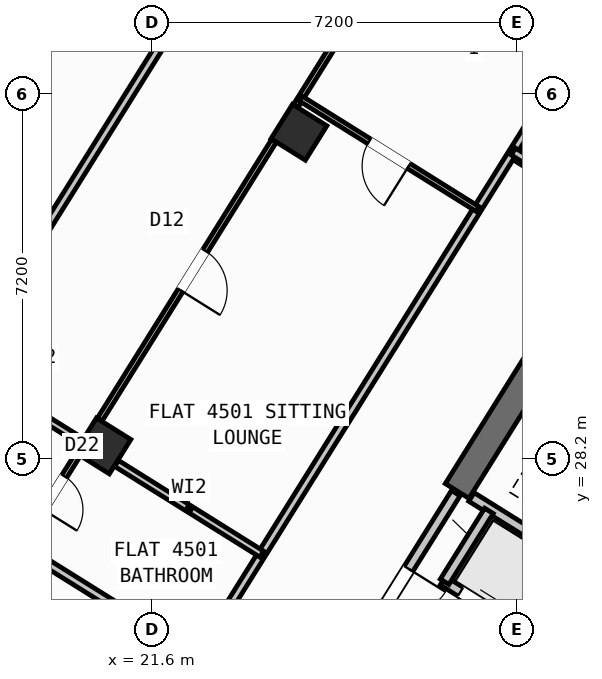
"""IFC4 building model, lengths in metres.
Left out: names, types, materials, properties, quantities, classifications, styles, units other than length and angle.
Written with IfcOpenShell. Run it as: python <this file> out.ifc"""

import sys

from ifc_helpers import new_model, si_unit, direction, frame, frame_2d, origin, origin_2d, place, context, subcontext, project, spatial, rectangle, hollow_rectangle, extrude, source, transform, mapped, element, fill, save


model = new_model("IFC4")
c1 = context("Model", 3, precision=1e-05, world=origin(), true_north=direction((0.0, 1.0)))
c2 = subcontext(c1, "Body", "Model", "MODEL_VIEW")
j1 = project(units=[si_unit("LENGTHUNIT", "METRE"), si_unit("PLANEANGLEUNIT", "RADIAN")], contexts=[c1])
p1 = place(None, origin())
s1 = spatial("IfcSite", under=j1, at=p1, CompositionType="ELEMENT")
p2 = place(p1, origin())
s2 = spatial("IfcBuilding", under=s1, at=p2, CompositionType="ELEMENT")
p3 = place(p2, frame((0.0, 0.0, 179.4)))
s3 = spatial("IfcBuildingStorey", under=s2, at=p3, CompositionType="ELEMENT", Elevation=179.4)
p4 = place(p3, frame((29.517, 30.594, 0.0), z_axis=(0.0, 0.0, 1.0), x_axis=(-0.529906864564, -0.848055844204, 0.0)))
e1 = element("IfcWall", 1, at=p4, inside=s3, PredefinedType="SHEAR", context=c2, shape_type="SweptSolid", body=[
    extrude(rectangle(XDim=3.575, YDim=0.55, at=frame_2d((1.788, 0.0))), origin(), (0.0, 0.0, 1.0), 4.55),
])
m1 = source(origin(), c2, "Body", "SweptSolid", [
    extrude(hollow_rectangle(XDim=0.8, YDim=0.8, WallThickness=0.032, at=origin_2d()), origin(), (0.0, 0.0, 1.0), 4.8),
])
for number, where, z_axis, x_axis in (
    (2, (24.5, 34.643, 0.0), (0.0, 0.0, 1.0), (-0.848, 0.53, 0.0)),
    (3, (20.632, 28.452, 0.0), (0.0, 0.0, 1.0), (-0.848, 0.53, 0.0)),
):
    element("IfcColumn", number, at=place(p3, frame(where, z_axis=z_axis, x_axis=x_axis)), inside=s3, PredefinedType="COLUMN", context=c2, shape_type="MappedRepresentation", body=[
        mapped(m1, transform((0.0, 0.0, 0.0), scale=1.0)),
    ])
p5 = place(p3, frame((31.76, 12.183, 0.0), z_axis=(0.0, 0.0, 1.0), x_axis=(-0.848047074256, 0.529920899612, 0.0)))
e4 = element("IfcWall", 4, at=p5, inside=s3, PredefinedType="STANDARD", context=c2, shape_type="SweptSolid", body=[
    extrude(rectangle(XDim=30.652, YDim=0.32, at=frame_2d((15.326, 0.0))), origin(), (0.0, 0.0, 1.0), 4.55),
])
p6 = place(p5, frame((21.52, 0.0, 0.0)))
e5 = element("IfcOpeningElement", 5, at=p6, cuts=e4, PredefinedType="OPENING", context=c2, shape_type="SweptSolid", body=[
    extrude(rectangle(XDim=1.2, YDim=2.15, at=frame_2d((0.6, 1.075))), frame((0.0, 0.17, 0.0), z_axis=(0.0, -1.0, 0.0), x_axis=(1.0, 0.0, 0.0)), (0.0, 0.0, 1.0), 0.34),
])
p7 = place(p5, frame((14.878, 0.0, 0.0)))
e6 = element("IfcOpeningElement", 6, at=p7, cuts=e4, PredefinedType="OPENING", context=c2, shape_type="SweptSolid", body=[
    extrude(rectangle(XDim=1.5, YDim=2.25, at=frame_2d((0.75, 1.125))), frame((0.0, 0.17, 0.0), z_axis=(0.0, -1.0, 0.0), x_axis=(1.0, 0.0, 0.0)), (0.0, 0.0, 1.0), 0.34),
])
p8 = place(p5, frame((1.865, 0.0, 0.75)))
e7 = element("IfcOpeningElement", 7, at=p8, cuts=e4, PredefinedType="OPENING", context=c2, shape_type="SweptSolid", body=[
    extrude(rectangle(XDim=2.4, YDim=1.6, at=frame_2d((1.2, 0.8))), frame((0.0, 0.17, 0.0), z_axis=(0.0, -1.0, 0.0), x_axis=(1.0, 0.0, 0.0)), (0.0, 0.0, 1.0), 0.34),
])
p9 = place(p5, frame((7.094, 0.0, 0.75)))
e8 = element("IfcOpeningElement", 8, at=p9, cuts=e4, PredefinedType="OPENING", context=c2, shape_type="SweptSolid", body=[
    extrude(rectangle(XDim=2.4, YDim=1.6, at=frame_2d((1.2, 0.8))), frame((0.0, 0.17, 0.0), z_axis=(0.0, -1.0, 0.0), x_axis=(1.0, 0.0, 0.0)), (0.0, 0.0, 1.0), 0.34),
])
p10 = place(p5, frame((19.404, 0.0, 0.95)))
e9 = element("IfcOpeningElement", 9, at=p10, cuts=e4, PredefinedType="OPENING", context=c2, shape_type="SweptSolid", body=[
    extrude(rectangle(XDim=1.2, YDim=1.4, at=frame_2d((0.6, 0.7))), frame((0.0, 0.17, 0.0), z_axis=(0.0, -1.0, 0.0), x_axis=(1.0, 0.0, 0.0)), (0.0, 0.0, 1.0), 0.34),
])
p11 = place(p5, frame((26.458, 0.0, 0.75)))
e10 = element("IfcOpeningElement", 10, at=p11, cuts=e4, PredefinedType="OPENING", context=c2, shape_type="SweptSolid", body=[
    extrude(rectangle(XDim=2.4, YDim=1.6, at=frame_2d((1.2, 0.8))), frame((0.0, 0.17, 0.0), z_axis=(0.0, -1.0, 0.0), x_axis=(1.0, 0.0, 0.0)), (0.0, 0.0, 1.0), 0.34),
])
p12 = place(p3, frame((17.424, 47.083, 0.0), z_axis=(0.0, 0.0, 1.0), x_axis=(0.848049927979, -0.529916332693, 0.0)))
e11 = element("IfcWall", 11, at=p12, inside=s3, PredefinedType="STANDARD", context=c2, shape_type="SweptSolid", body=[
    extrude(rectangle(XDim=29.223, YDim=0.32, at=frame_2d((14.612, 0.0))), origin(), (0.0, 0.0, 1.0), 4.55),
])
p13 = place(p12, frame((2.745, 0.0, 0.0)))
e12 = element("IfcOpeningElement", 12, at=p13, cuts=e11, PredefinedType="OPENING", context=c2, shape_type="SweptSolid", body=[
    extrude(rectangle(XDim=1.05, YDim=2.15, at=frame_2d((0.525, 1.075))), frame((0.0, 0.17, 0.0), z_axis=(0.0, -1.0, 0.0), x_axis=(1.0, 0.0, 0.0)), (0.0, 0.0, 1.0), 0.34),
])
p14 = place(p12, frame((21.926, 0.0, 0.75)))
e13 = element("IfcOpeningElement", 13, at=p14, cuts=e11, PredefinedType="OPENING", context=c2, shape_type="SweptSolid", body=[
    extrude(rectangle(XDim=2.4, YDim=1.6, at=frame_2d((1.2, 0.8))), frame((0.0, 0.17, 0.0), z_axis=(0.0, -1.0, 0.0), x_axis=(1.0, 0.0, 0.0)), (0.0, 0.0, 1.0), 0.34),
])
p15 = place(p12, frame((26.934, 0.0, 0.95)))
e14 = element("IfcOpeningElement", 14, at=p15, cuts=e11, PredefinedType="OPENING", context=c2, shape_type="SweptSolid", body=[
    extrude(rectangle(XDim=1.2, YDim=1.4, at=frame_2d((0.6, 0.7))), frame((0.0, 0.17, 0.0), z_axis=(0.0, -1.0, 0.0), x_axis=(1.0, 0.0, 0.0)), (0.0, 0.0, 1.0), 0.34),
])
p16 = place(p12, frame((10.057, 0.0, 1.0)))
e15 = element("IfcOpeningElement", 15, at=p16, cuts=e11, PredefinedType="OPENING", context=c2, shape_type="SweptSolid", body=[
    extrude(rectangle(XDim=0.65, YDim=1.15, at=frame_2d((0.325, 0.575))), frame((0.0, 0.17, 0.0), z_axis=(0.0, -1.0, 0.0), x_axis=(1.0, 0.0, 0.0)), (0.0, 0.0, 1.0), 0.34),
])
p17 = place(p12, frame((14.636, 0.0, 1.0)))
e16 = element("IfcOpeningElement", 16, at=p17, cuts=e11, PredefinedType="OPENING", context=c2, shape_type="SweptSolid", body=[
    extrude(rectangle(XDim=0.9, YDim=1.25, at=frame_2d((0.45, 0.625))), frame((0.0, 0.17, 0.0), z_axis=(0.0, -1.0, 0.0), x_axis=(1.0, 0.0, 0.0)), (0.0, 0.0, 1.0), 0.34),
])
p18 = place(p12, frame((8.052, 0.0, 1.0)))
e17 = element("IfcOpeningElement", 17, at=p18, cuts=e11, PredefinedType="OPENING", context=c2, shape_type="SweptSolid", body=[
    extrude(rectangle(XDim=0.65, YDim=1.15, at=frame_2d((0.325, 0.575))), frame((0.0, 0.17, 0.0), z_axis=(0.0, -1.0, 0.0), x_axis=(1.0, 0.0, 0.0)), (0.0, 0.0, 1.0), 0.34),
])
p19 = place(p3, frame((31.822, 24.998, 0.0), z_axis=(0.0, 0.0, 1.0), x_axis=(-0.848036912365, 0.52993716162, 0.0)))
e18 = element("IfcWall", 18, at=p19, inside=s3, PredefinedType="STANDARD", context=c2, shape_type="SweptSolid", body=[
    extrude(rectangle(XDim=4.618, YDim=0.2, at=frame_2d((2.309, 0.0))), origin(), (0.0, 0.0, 1.0), 4.54),
])
p20 = place(p3, frame((32.108, 22.814, 0.0), z_axis=(0.0, 0.0, 1.0), x_axis=(-0.848042229521, 0.529928652696, 0.0)))
e19 = element("IfcWall", 19, at=p20, inside=s3, PredefinedType="STANDARD", context=c2, shape_type="SweptSolid", body=[
    extrude(rectangle(XDim=5.62, YDim=0.2, at=frame_2d((2.81, 0.0))), origin(), (0.0, 0.0, 1.0), 4.54),
])
p21 = place(p20, frame((0.39, 0.0, 0.0)))
e20 = element("IfcOpeningElement", 20, at=p21, cuts=e19, PredefinedType="OPENING", context=c2, shape_type="SweptSolid", body=[
    extrude(rectangle(XDim=1.1, YDim=2.15, at=frame_2d((0.55, 1.075))), frame((0.0, 0.11, 0.0), z_axis=(0.0, -1.0, 0.0), x_axis=(1.0, 0.0, 0.0)), (0.0, 0.0, 1.0), 0.22),
])
p22 = place(p20, frame((2.25, 0.0, 0.0)))
e21 = element("IfcOpeningElement", 21, at=p22, cuts=e19, PredefinedType="OPENING", context=c2, shape_type="SweptSolid", body=[
    extrude(rectangle(XDim=1.1, YDim=2.15, at=frame_2d((0.55, 1.075))), frame((0.0, 0.11, 0.0), z_axis=(0.0, -1.0, 0.0), x_axis=(1.0, 0.0, 0.0)), (0.0, 0.0, 1.0), 0.22),
])
p23 = place(p20, frame((4.11, 0.0, 0.0)))
e22 = element("IfcOpeningElement", 22, at=p23, cuts=e19, PredefinedType="OPENING", context=c2, shape_type="SweptSolid", body=[
    extrude(rectangle(XDim=1.1, YDim=2.15, at=frame_2d((0.55, 1.075))), frame((0.0, 0.11, 0.0), z_axis=(0.0, -1.0, 0.0), x_axis=(1.0, 0.0, 0.0)), (0.0, 0.0, 1.0), 0.22),
])
p24 = place(p3, frame((28.25, 27.17, 0.0), z_axis=(0.0, 0.0, 1.0), x_axis=(-0.529905827651, -0.848056492117, 0.0)))
e23 = element("IfcWall", 23, at=p24, inside=s3, PredefinedType="STANDARD", context=c2, shape_type="SweptSolid", body=[
    extrude(rectangle(XDim=1.65, YDim=0.2, at=frame_2d((0.825, 0.0))), origin(), (0.0, 0.0, 1.0), 4.54),
])
p25 = place(p3, frame((29.801, 26.142, 0.0), z_axis=(0.0, 0.0, 1.0), x_axis=(-0.529998940003, -0.847998304005, 0.0)))
e24 = element("IfcWall", 24, at=p25, inside=s3, PredefinedType="STANDARD", context=c2, shape_type="SweptSolid", body=[
    extrude(rectangle(XDim=1.58, YDim=0.2, at=frame_2d((0.79, 0.0))), origin(), (0.0, 0.0, 1.0), 4.54),
])
p26 = place(p3, frame((27.596, 27.52, 0.0), z_axis=(0.0, 0.0, 1.0), x_axis=(-0.529865479138, -0.848081702443, 0.0)))
e25 = element("IfcWall", 25, at=p26, inside=s3, PredefinedType="STANDARD", context=c2, shape_type="SweptSolid", body=[
    extrude(rectangle(XDim=2.96, YDim=0.2, at=frame_2d((1.48, 0.0))), origin(), (0.0, 0.0, 1.0), 4.54),
])
p27 = place(p26, frame((1.76, 0.0, 0.0)))
e26 = element("IfcOpeningElement", 26, at=p27, cuts=e25, PredefinedType="OPENING", context=c2, shape_type="SweptSolid", body=[
    extrude(rectangle(XDim=0.86, YDim=2.05, at=frame_2d((0.43, 1.025))), frame((0.0, 0.11, 0.0), z_axis=(0.0, -1.0, 0.0), x_axis=(1.0, 0.0, 0.0)), (0.0, 0.0, 1.0), 0.22),
])
p28 = place(p3, frame((30.914, 32.829, 0.0), z_axis=(0.0, 0.0, 1.0), x_axis=(-0.848008813643, 0.529982124211, 0.0)))
e27 = element("IfcWall", 27, at=p28, inside=s3, PredefinedType="PARTITIONING", context=c2, shape_type="SweptSolid", body=[
    extrude(rectangle(XDim=2.61, YDim=0.16, at=frame_2d((1.305, 0.0))), origin(), (0.0, 0.0, 1.0), 4.54),
])
p29 = place(p3, frame((31.239, 38.274, 0.0), z_axis=(0.0, 0.0, 1.0), x_axis=(-0.529921796515, -0.848046513806, 0.0)))
e28 = element("IfcWall", 28, at=p29, inside=s3, PredefinedType="PARTITIONING", context=c2, shape_type="SweptSolid", body=[
    extrude(rectangle(XDim=16.5, YDim=0.16, at=frame_2d((8.25, 0.0))), origin(), (0.0, 0.0, 1.0), 4.54),
])
p30 = place(p3, frame((22.495, 24.281, 0.0), z_axis=(0.0, 0.0, 1.0), x_axis=(-0.848052408131, 0.529912363569, 0.0)))
e29 = element("IfcWall", 29, at=p30, inside=s3, PredefinedType="PARTITIONING", context=c2, shape_type="SweptSolid", body=[
    extrude(rectangle(XDim=16.73, YDim=0.16, at=frame_2d((8.365, 0.0))), origin(), (0.0, 0.0, 1.0), 4.54),
])
p31 = place(p30, frame((5.068, 0.0, 0.0)))
e30 = element("IfcOpeningElement", 30, at=p31, cuts=e29, PredefinedType="OPENING", context=c2, shape_type="SweptSolid", body=[
    extrude(rectangle(XDim=1.0, YDim=2.1, at=frame_2d((0.5, 1.05))), frame((0.0, 0.09, 0.0), z_axis=(0.0, -1.0, 0.0), x_axis=(1.0, 0.0, 0.0)), (0.0, 0.0, 1.0), 0.18),
])
p32 = place(p30, frame((9.011, 0.0, 0.0)))
e31 = element("IfcOpeningElement", 31, at=p32, cuts=e29, PredefinedType="OPENING", context=c2, shape_type="SweptSolid", body=[
    extrude(rectangle(XDim=1.0, YDim=2.1, at=frame_2d((0.5, 1.05))), frame((0.0, 0.09, 0.0), z_axis=(0.0, -1.0, 0.0), x_axis=(1.0, 0.0, 0.0)), (0.0, 0.0, 1.0), 0.18),
])
p33 = place(p3, frame((21.329, 22.416, 0.0), z_axis=(0.0, 0.0, 1.0), x_axis=(-0.848052408131, 0.529912363569, 0.0)))
e32 = element("IfcWall", 32, at=p33, inside=s3, PredefinedType="PARTITIONING", context=c2, shape_type="SweptSolid", body=[
    extrude(rectangle(XDim=16.73, YDim=0.16, at=frame_2d((8.365, 0.0))), origin(), (0.0, 0.0, 1.0), 4.54),
])
p34 = place(p33, frame((1.505, 0.0, 0.0)))
e33 = element("IfcOpeningElement", 33, at=p34, cuts=e32, PredefinedType="OPENING", context=c2, shape_type="SweptSolid", body=[
    extrude(rectangle(XDim=1.0, YDim=2.1, at=frame_2d((0.5, 1.05))), frame((0.0, 0.09, 0.0), z_axis=(0.0, -1.0, 0.0), x_axis=(1.0, 0.0, 0.0)), (0.0, 0.0, 1.0), 0.18),
])
p35 = place(p33, frame((6.435, 0.0, 0.0)))
e34 = element("IfcOpeningElement", 34, at=p35, cuts=e32, PredefinedType="OPENING", context=c2, shape_type="SweptSolid", body=[
    extrude(rectangle(XDim=1.0, YDim=2.1, at=frame_2d((0.5, 1.05))), frame((0.0, 0.09, 0.0), z_axis=(0.0, -1.0, 0.0), x_axis=(1.0, 0.0, 0.0)), (0.0, 0.0, 1.0), 0.18),
])
p36 = place(p33, frame((12.784, 0.0, 0.0)))
e35 = element("IfcOpeningElement", 35, at=p36, cuts=e32, PredefinedType="OPENING", context=c2, shape_type="SweptSolid", body=[
    extrude(rectangle(XDim=1.0, YDim=2.1, at=frame_2d((0.5, 1.05))), frame((0.0, 0.09, 0.0), z_axis=(0.0, -1.0, 0.0), x_axis=(1.0, 0.0, 0.0)), (0.0, 0.0, 1.0), 0.18),
])
p37 = place(p3, frame((25.351, 42.095, 0.0), z_axis=(0.0, 0.0, 1.0), x_axis=(-0.529926315456, -0.848043690023, 0.0)))
e36 = element("IfcWall", 36, at=p37, inside=s3, PredefinedType="PARTITIONING", context=c2, shape_type="SweptSolid", body=[
    extrude(rectangle(XDim=16.62, YDim=0.16, at=frame_2d((8.31, 0.0))), origin(), (0.0, 0.0, 1.0), 4.54),
])
p38 = place(p3, frame((27.889, 40.685, 0.0), z_axis=(0.0, 0.0, 1.0), x_axis=(-0.529924752708, -0.848044666552, 0.0)))
e37 = element("IfcWall", 37, at=p38, inside=s3, PredefinedType="PARTITIONING", context=c2, shape_type="SweptSolid", body=[
    extrude(rectangle(XDim=6.508, YDim=0.11, at=frame_2d((3.254, 0.0))), origin(), (0.0, 0.0, 1.0), 4.54),
])
p39 = place(p3, frame((24.004, 34.467, 0.0), z_axis=(0.0, 0.0, 1.0), x_axis=(-0.529907440938, -0.848055484057, 0.0)))
e38 = element("IfcWall", 38, at=p39, inside=s3, PredefinedType="PARTITIONING", context=c2, shape_type="SweptSolid", body=[
    extrude(rectangle(XDim=6.476, YDim=0.11, at=frame_2d((3.238, 0.0))), origin(), (0.0, 0.0, 1.0), 4.54),
])
p40 = place(p39, frame((2.552, 0.0, 0.0)))
e39 = element("IfcOpeningElement", 39, at=p40, cuts=e38, PredefinedType="OPENING", context=c2, shape_type="SweptSolid", body=[
    extrude(rectangle(XDim=0.92, YDim=2.08, at=frame_2d((0.46, 1.04))), frame((0.0, 0.065, 0.0), z_axis=(0.0, -1.0, 0.0), x_axis=(1.0, 0.0, 0.0)), (0.0, 0.0, 1.0), 0.13),
])
p41 = place(p3, frame((20.135, 28.277, 0.0), z_axis=(0.0, 0.0, 1.0), x_axis=(-0.529844966244, -0.848094518167, 0.0)))
e40 = element("IfcWall", 40, at=p41, inside=s3, PredefinedType="PARTITIONING", context=c2, shape_type="SweptSolid", body=[
    extrude(rectangle(XDim=2.138, YDim=0.11, at=frame_2d((1.069, 0.0))), origin(), (0.0, 0.0, 1.0), 4.54),
])
p42 = place(p41, frame((0.498, 0.0, 0.0)))
e41 = element("IfcOpeningElement", 41, at=p42, cuts=e40, PredefinedType="OPENING", context=c2, shape_type="SweptSolid", body=[
    extrude(rectangle(XDim=0.78, YDim=2.05, at=frame_2d((0.39, 1.025))), frame((0.0, 0.065, 0.0), z_axis=(0.0, -1.0, 0.0), x_axis=(1.0, 0.0, 0.0)), (0.0, 0.0, 1.0), 0.13),
])
p43 = place(p3, frame((20.203, 28.543, 0.0), z_axis=(0.0, 0.0, 1.0), x_axis=(-0.848066485351, 0.529889834233, 0.0)))
e42 = element("IfcWall", 42, at=p43, inside=s3, PredefinedType="PLUMBINGWALL", context=c2, shape_type="SweptSolid", body=[
    extrude(rectangle(XDim=2.816, YDim=0.14, at=frame_2d((1.408, 0.0))), origin(), (0.0, 0.0, 1.0), 4.025),
])
p44 = place(p43, frame((0.906, 0.0, 0.0)))
e43 = element("IfcOpeningElement", 43, at=p44, cuts=e42, PredefinedType="OPENING", context=c2, shape_type="SweptSolid", body=[
    extrude(rectangle(XDim=0.92, YDim=2.08, at=frame_2d((0.46, 1.04))), frame((0.0, 0.08, 0.0), z_axis=(0.0, -1.0, 0.0), x_axis=(1.0, 0.0, 0.0)), (0.0, 0.0, 1.0), 0.16),
])
p45 = place(p3, frame((23.767, 26.316, 0.0), z_axis=(0.0, 0.0, 1.0), x_axis=(-0.848055143312, 0.529907986259, 0.0)))
e44 = element("IfcWall", 44, at=p45, inside=s3, PredefinedType="PLUMBINGWALL", context=c2, shape_type="SweptSolid", body=[
    extrude(rectangle(XDim=3.378, YDim=0.14, at=frame_2d((1.689, 0.0))), origin(), (0.0, 0.0, 1.0), 4.025),
])
p46 = place(p3, frame((28.023, 33.129, 0.0), z_axis=(0.0, 0.0, 1.0), x_axis=(-0.848051592054, 0.529913669587, 0.0)))
e45 = element("IfcWall", 45, at=p46, inside=s3, PredefinedType="PARTITIONING", context=c2, shape_type="SweptSolid", body=[
    extrude(rectangle(XDim=4.118, YDim=0.11, at=frame_2d((2.059, 0.0))), origin(), (0.0, 0.0, 1.0), 4.54),
])
p47 = place(p46, frame((1.599, 0.0, 0.0)))
e46 = element("IfcOpeningElement", 46, at=p47, cuts=e45, PredefinedType="OPENING", context=c2, shape_type="SweptSolid", body=[
    extrude(rectangle(XDim=0.92, YDim=2.08, at=frame_2d((0.46, 1.04))), frame((0.0, 0.065, 0.0), z_axis=(0.0, -1.0, 0.0), x_axis=(1.0, 0.0, 0.0)), (0.0, 0.0, 1.0), 0.13),
])
p48 = place(p3, frame((21.202, 44.864, 0.0), z_axis=(0.0, 0.0, 1.0), x_axis=(-0.529920421309, -0.848047373134, 0.0)))
e47 = element("IfcWall", 47, at=p48, inside=s3, PredefinedType="PARTITIONING", context=c2, shape_type="SweptSolid", body=[
    extrude(rectangle(XDim=16.77, YDim=0.11, at=frame_2d((8.385, 0.0))), origin(), (0.0, 0.0, 1.0), 4.54),
])
p49 = place(p48, frame((15.13, 0.0, 0.0)))
e48 = element("IfcOpeningElement", 48, at=p49, cuts=e47, PredefinedType="OPENING", context=c2, shape_type="SweptSolid", body=[
    extrude(rectangle(XDim=0.78, YDim=2.05, at=frame_2d((0.39, 1.025))), frame((0.0, 0.065, 0.0), z_axis=(0.0, -1.0, 0.0), x_axis=(1.0, 0.0, 0.0)), (0.0, 0.0, 1.0), 0.13),
])
p50 = place(p48, frame((9.884, 0.0, 0.0)))
e49 = element("IfcOpeningElement", 49, at=p50, cuts=e47, PredefinedType="OPENING", context=c2, shape_type="SweptSolid", body=[
    extrude(rectangle(XDim=0.92, YDim=2.08, at=frame_2d((0.46, 1.04))), frame((0.0, 0.065, 0.0), z_axis=(0.0, -1.0, 0.0), x_axis=(1.0, 0.0, 0.0)), (0.0, 0.0, 1.0), 0.13),
])
p51 = place(p3, frame((41.936, 26.012, 0.0), z_axis=(0.0, 0.0, 1.0), x_axis=(-0.848051154596, 0.529914369676, 0.0)))
e50 = element("IfcWall", 50, at=p51, inside=s3, PredefinedType="PARTITIONING", context=c2, shape_type="SweptSolid", body=[
    extrude(rectangle(XDim=15.57, YDim=0.16, at=frame_2d((7.785, 0.0))), origin(), (0.0, 0.0, 1.0), 4.54),
])
p52 = place(p51, frame((4.1, 0.0, 0.0)))
e51 = element("IfcOpeningElement", 51, at=p52, cuts=e50, PredefinedType="OPENING", context=c2, shape_type="SweptSolid", body=[
    extrude(rectangle(XDim=0.96, YDim=2.08, at=frame_2d((0.48, 1.04))), frame((0.0, 0.09, 0.0), z_axis=(0.0, -1.0, 0.0), x_axis=(1.0, 0.0, 0.0)), (0.0, 0.0, 1.0), 0.18),
])
p53 = place(p51, frame((8.2, 0.0, 0.0)))
e52 = element("IfcOpeningElement", 52, at=p53, cuts=e50, PredefinedType="OPENING", context=c2, shape_type="SweptSolid", body=[
    extrude(rectangle(XDim=1.7, YDim=2.2, at=frame_2d((0.85, 1.1))), frame((0.0, 0.09, 0.0), z_axis=(0.0, -1.0, 0.0), x_axis=(1.0, 0.0, 0.0)), (0.0, 0.0, 1.0), 0.18),
])
m2 = source(origin(), c2, "Body", "SweptSolid", [
    extrude(rectangle(XDim=1.1, YDim=2.15, at=frame_2d((0.55, 1.075))), frame((0.0, 0.025, 0.0), z_axis=(0.0, -1.0, 0.0), x_axis=(1.0, 0.0, 0.0)), (0.0, 0.0, 1.0), 0.05),
])
p54 = place(p23, origin())
e53 = element("IfcDoor", 53, at=p54, inside=s3, OperationType="DOUBLE_DOOR_SLIDING", PredefinedType="DOOR", context=c2, shape_type="MappedRepresentation", body=[
    mapped(m2, transform((0.0, 0.0, 0.0), scale=1.0)),
])
fill(e22, e53)
m3 = source(origin(), c2, "Body", "SweptSolid", [
    extrude(rectangle(XDim=0.86, YDim=2.05, at=frame_2d((0.43, 1.025))), frame((0.0, 0.025, 0.0), z_axis=(0.0, -1.0, 0.0), x_axis=(1.0, 0.0, 0.0)), (0.0, 0.0, 1.0), 0.05),
])
p55 = place(p27, origin())
e54 = element("IfcDoor", 54, at=p55, inside=s3, OperationType="SINGLE_SWING_LEFT", PredefinedType="DOOR", context=c2, shape_type="MappedRepresentation", body=[
    mapped(m3, transform((0.0, 0.0, 0.0), scale=1.0)),
])
fill(e26, e54)
m4 = source(origin(), c2, "Body", "SweptSolid", [
    extrude(rectangle(XDim=0.78, YDim=2.05, at=frame_2d((0.39, 1.025))), frame((0.0, 0.025, 0.0), z_axis=(0.0, -1.0, 0.0), x_axis=(1.0, 0.0, 0.0)), (0.0, 0.0, 1.0), 0.05),
])
p56 = place(p42, origin())
e55 = element("IfcDoor", 55, at=p56, inside=s3, OperationType="SINGLE_SWING_RIGHT", PredefinedType="DOOR", context=c2, shape_type="MappedRepresentation", body=[
    mapped(m4, transform((0.0, 0.0, 0.0), scale=1.0)),
])
fill(e41, e55)
m5 = source(origin(), c2, "Body", "SweptSolid", [
    extrude(rectangle(XDim=0.92, YDim=2.08, at=frame_2d((0.46, 1.04))), frame((0.0, 0.025, 0.0), z_axis=(0.0, -1.0, 0.0), x_axis=(1.0, 0.0, 0.0)), (0.0, 0.0, 1.0), 0.05),
])
p57 = place(p40, origin())
e56 = element("IfcDoor", 56, at=p57, inside=s3, OperationType="SINGLE_SWING_RIGHT", PredefinedType="DOOR", context=c2, shape_type="MappedRepresentation", body=[
    mapped(m5, transform((0.0, 0.0, 0.0), scale=1.0)),
])
fill(e39, e56)
p58 = place(p47, origin())
e57 = element("IfcDoor", 57, at=p58, inside=s3, OperationType="SINGLE_SWING_LEFT", PredefinedType="DOOR", context=c2, shape_type="MappedRepresentation", body=[
    mapped(m5, transform((0.0, 0.0, 0.0), scale=1.0)),
])
fill(e46, e57)
save(model, sys.argv[1])
